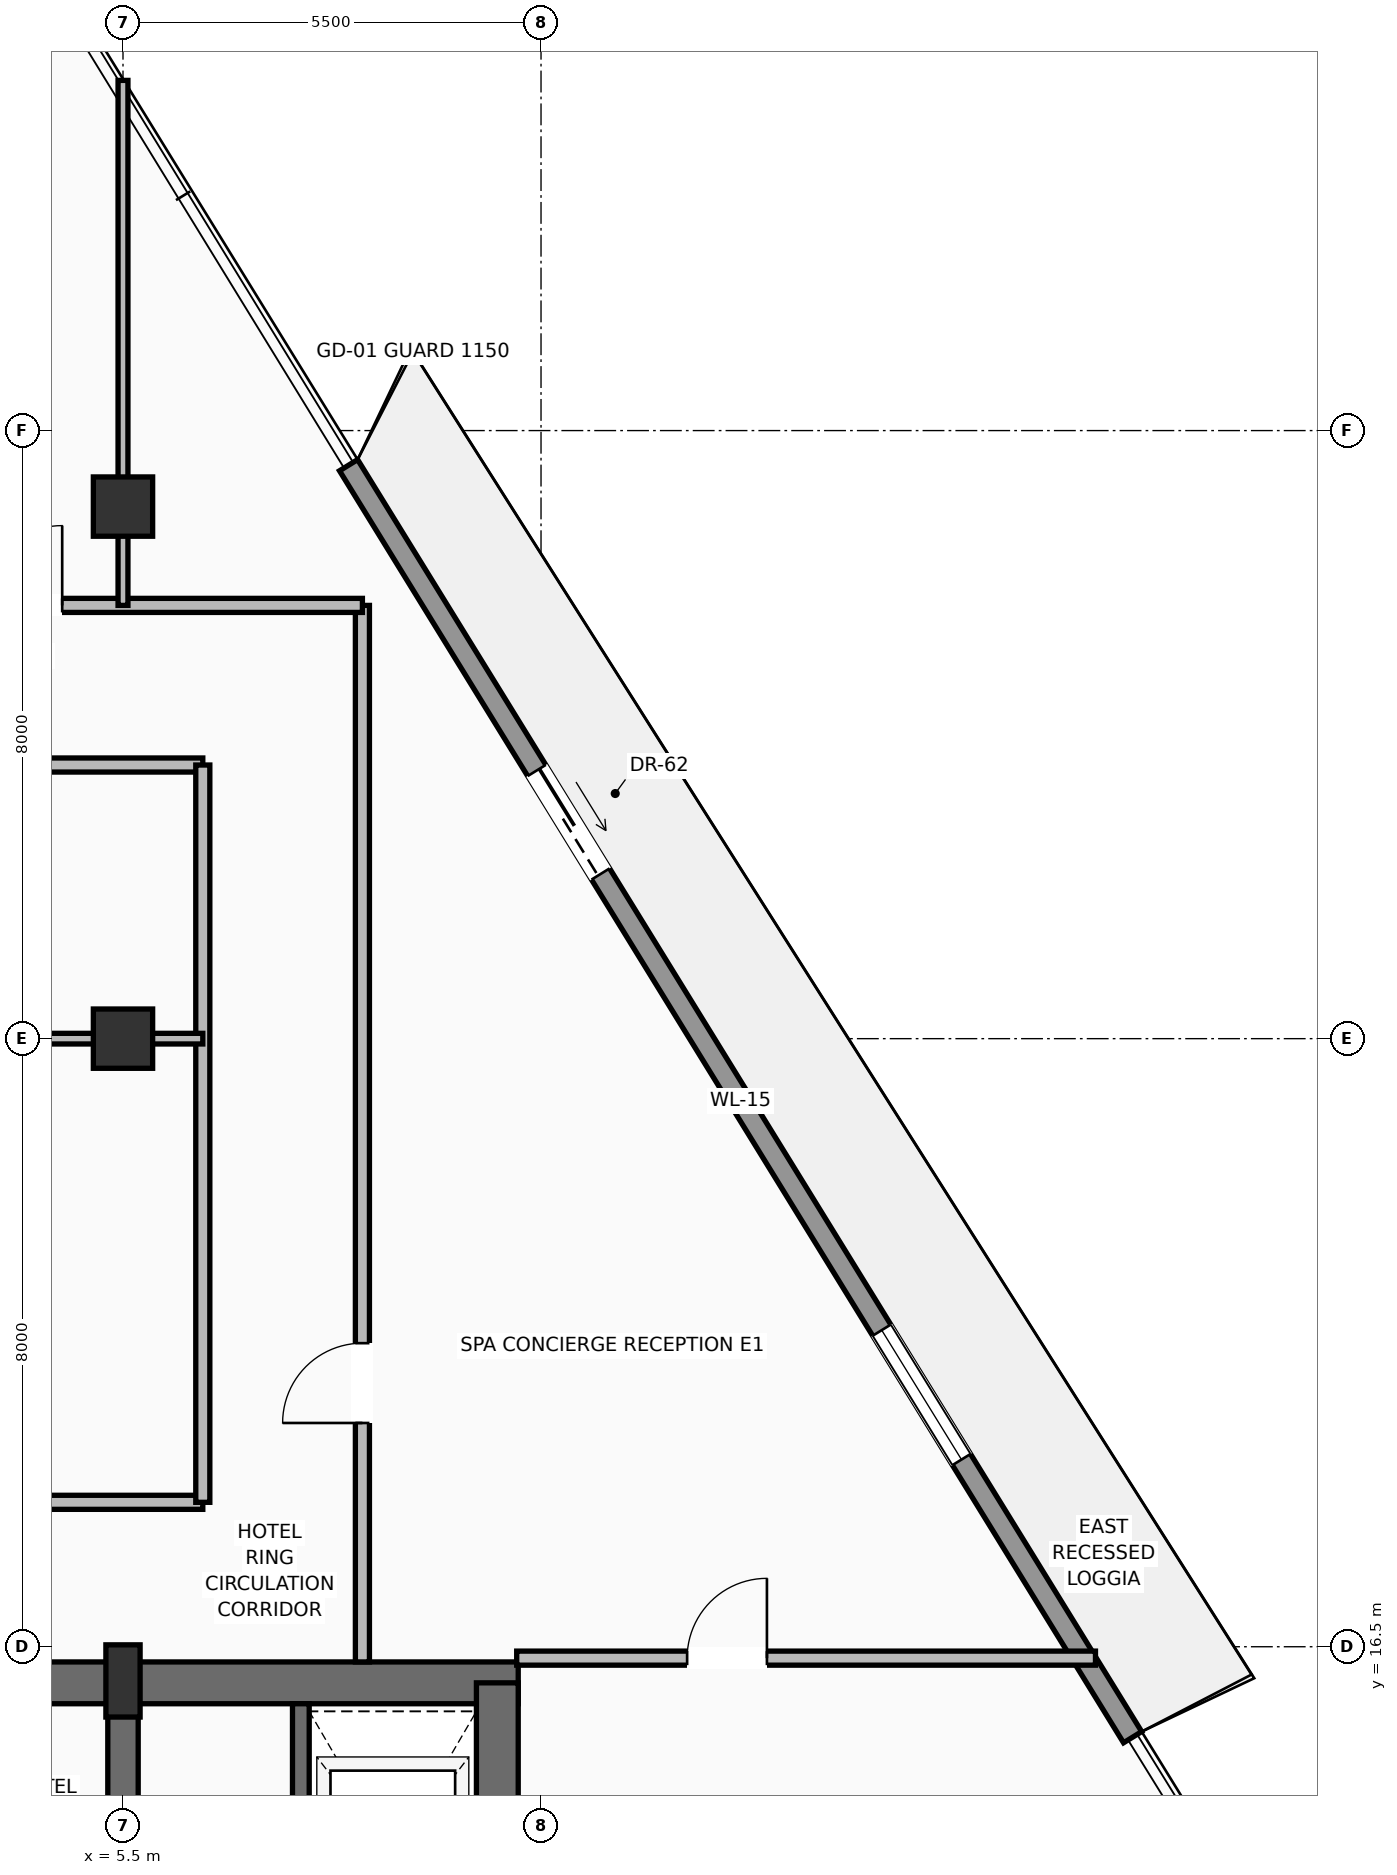
"""IFC4 building model, lengths in metres.
Left out: names, types, materials, properties, quantities, classifications, styles, units other than length and angle.
Written with IfcOpenShell. Run it as: python <this file> out.ifc"""

import sys

from ifc_helpers import new_model, si_unit, direction, frame, frame_2d, origin, origin_2d, place, context, subcontext, project, spatial, rectangle, extrude, source, transform, mapped, element, fill, save


model = new_model("IFC4")
c1 = context("Model", 3, precision=1e-05, world=origin(), true_north=direction((0.0, 1.0)))
c2 = subcontext(c1, "Body", "Model", "MODEL_VIEW")
j1 = project(units=[si_unit("LENGTHUNIT", "METRE"), si_unit("PLANEANGLEUNIT", "RADIAN")], contexts=[c1])
p1 = place(None, origin())
s1 = spatial("IfcSite", under=j1, at=p1, CompositionType="ELEMENT")
p2 = place(p1, origin())
s2 = spatial("IfcBuilding", under=s1, at=p2, CompositionType="ELEMENT")
p3 = place(p2, frame((0.0, 0.0, 240.7)))
s3 = spatial("IfcBuildingStorey", under=s2, at=p3, CompositionType="ELEMENT", Elevation=240.7)
p4 = place(p3, frame((-10.7, 16.025, 0.0), z_axis=(0.0, 0.0, 1.0), x_axis=(1.0, 0.0, 0.0)))
e1 = element("IfcWall", 1, at=p4, inside=s3, PredefinedType="SHEAR", context=c2, shape_type="SweptSolid", body=[
    extrude(rectangle(XDim=21.4, YDim=0.55, at=frame_2d((10.7, 0.0))), origin(), (0.0, 0.0, 1.0), 3.24),
])
p5 = place(p4, frame((3.27, 0.0, 0.0)))
e2 = element("IfcOpeningElement", 2, at=p5, cuts=e1, PredefinedType="OPENING", context=c2, shape_type="SweptSolid", body=[
    extrude(rectangle(XDim=1.3, YDim=2.3, at=frame_2d((0.65, 1.15))), frame((0.0, 0.285, 0.0), z_axis=(0.0, -1.0, 0.0), x_axis=(1.0, 0.0, 0.0)), (0.0, 0.0, 1.0), 0.57),
])
p6 = place(p4, frame((9.7, 0.0, 0.0)))
e3 = element("IfcOpeningElement", 3, at=p6, cuts=e1, PredefinedType="OPENING", context=c2, shape_type="SweptSolid", body=[
    extrude(rectangle(XDim=2.0, YDim=2.4, at=frame_2d((1.0, 1.2))), frame((0.0, 0.285, 0.0), z_axis=(0.0, -1.0, 0.0), x_axis=(1.0, 0.0, 0.0)), (0.0, 0.0, 1.0), 0.57),
])
p7 = place(p3, frame((10.425, 0.575, 0.0), z_axis=(0.0, 0.0, 1.0), x_axis=(0.0, 1.0, 0.0)))
e4 = element("IfcWall", 4, at=p7, inside=s3, PredefinedType="SHEAR", context=c2, shape_type="SweptSolid", body=[
    extrude(rectangle(XDim=15.45, YDim=0.55, at=frame_2d((7.725, 0.0))), origin(), (0.0, 0.0, 1.0), 3.24),
])
p8 = place(p3, frame((5.5, 0.575, 0.0), z_axis=(0.0, 0.0, 1.0), x_axis=(0.0, 1.0, 0.0)))
e5 = element("IfcWall", 5, at=p8, inside=s3, PredefinedType="SHEAR", context=c2, shape_type="SweptSolid", body=[
    extrude(rectangle(XDim=15.45, YDim=0.4, at=frame_2d((7.725, 0.0))), origin(), (0.0, 0.0, 1.0), 3.24),
])
p9 = place(p8, frame((8.925, 0.0, 0.0)))
e6 = element("IfcOpeningElement", 6, at=p9, cuts=e5, PredefinedType="OPENING", context=c2, shape_type="SweptSolid", body=[
    extrude(rectangle(XDim=1.1, YDim=2.2, at=frame_2d((0.55, 1.1))), frame((0.0, 0.21, 0.0), z_axis=(0.0, -1.0, 0.0), x_axis=(1.0, 0.0, 0.0)), (0.0, 0.0, 1.0), 0.42),
])
m1 = source(origin(), c2, "Body", "SweptSolid", [
    extrude(rectangle(XDim=0.45, YDim=0.95, at=origin_2d()), origin(), (0.0, 0.0, 1.0), 3.45),
])
p10 = place(p3, frame((5.5, 16.05, 0.0), z_axis=(0.0, 0.0, 1.0), x_axis=(1.0, 0.0, 0.0)))
e7 = element("IfcColumn", 7, at=p10, inside=s3, PredefinedType="PILASTER", context=c2, shape_type="MappedRepresentation", body=[
    mapped(m1, transform((0.0, 0.0, 0.0), scale=1.0)),
])
m2 = source(origin(), c2, "Body", "SweptSolid", [
    extrude(rectangle(XDim=0.78, YDim=0.78, at=origin_2d()), origin(), (0.0, 0.0, 1.0), 3.45),
])
for number, where, z_axis, x_axis in (
    (8, (5.5, 24.5, 0.0), (0.0, 0.0, 1.0), (1.0, 0.0, 0.0)),
    (9, (5.5, 31.5, 0.0), (0.0, 0.0, 1.0), (1.0, 0.0, 0.0)),
):
    element("IfcColumn", number, at=place(p3, frame(where, z_axis=z_axis, x_axis=x_axis)), inside=s3, PredefinedType="COLUMN", context=c2, shape_type="MappedRepresentation", body=[
        mapped(m2, transform((0.0, 0.0, 0.0), scale=1.0)),
    ])
p11 = place(p3, frame((8.468, 32.044, 0.0), z_axis=(0.0, 0.0, 1.0), x_axis=(0.524731986951, -0.851267491374, 0.0)))
e10 = element("IfcWall", 10, at=p11, inside=s3, PredefinedType="SOLIDWALL", context=c2, shape_type="SweptSolid", body=[
    extrude(rectangle(XDim=19.658, YDim=0.28, at=frame_2d((9.829, 0.0))), origin(), (0.0, 0.0, 1.0), 2.82),
])
p12 = place(p11, frame((4.718, 0.0, 0.0)))
e11 = element("IfcOpeningElement", 11, at=p12, cuts=e10, PredefinedType="OPENING", context=c2, shape_type="SweptSolid", body=[
    extrude(rectangle(XDim=1.6, YDim=2.35, at=frame_2d((0.8, 1.175))), frame((0.0, 0.15, 0.0), z_axis=(0.0, -1.0, 0.0), x_axis=(1.0, 0.0, 0.0)), (0.0, 0.0, 1.0), 0.3),
])
p13 = place(p11, frame((13.368, 0.0, 0.9)))
e12 = element("IfcOpeningElement", 12, at=p13, cuts=e10, PredefinedType="OPENING", context=c2, shape_type="SweptSolid", body=[
    extrude(rectangle(XDim=2.0, YDim=1.75, at=frame_2d((1.0, 0.875))), frame((0.0, 0.15, 0.0), z_axis=(0.0, -1.0, 0.0), x_axis=(1.0, 0.0, 0.0)), (0.0, 0.0, 1.0), 0.3),
])
p14 = place(p3, frame((7.84, 11.87, 0.0), z_axis=(0.0, 0.0, 1.0), x_axis=(0.0, 1.0, 0.0)))
e13 = element("IfcWall", 13, at=p14, inside=s3, PredefinedType="SOLIDWALL", context=c2, shape_type="SweptSolid", body=[
    extrude(rectangle(XDim=3.88, YDim=0.22, at=frame_2d((1.94, 0.0))), origin(), (0.0, 0.0, 1.0), 3.24),
])
p15 = place(p3, frame((-5.85, 18.4, 0.0), z_axis=(0.0, 0.0, 1.0), x_axis=(1.0, 0.0, 0.0)))
e14 = element("IfcWall", 14, at=p15, inside=s3, PredefinedType="PARTITIONING", context=c2, shape_type="SweptSolid", body=[
    extrude(rectangle(XDim=12.4, YDim=0.185, at=frame_2d((6.2, 0.0))), origin(), (0.0, 0.0, 1.0), 3.232),
])
p16 = place(p15, frame((5.725, 0.0, 0.0)))
e15 = element("IfcOpeningElement", 15, at=p16, cuts=e14, PredefinedType="OPENING", context=c2, shape_type="SweptSolid", body=[
    extrude(rectangle(XDim=0.95, YDim=2.2, at=frame_2d((0.475, 1.1))), frame((0.0, 0.103, 0.0), z_axis=(0.0, -1.0, 0.0), x_axis=(1.0, 0.0, 0.0)), (0.0, 0.0, 1.0), 0.205),
])
p17 = place(p3, frame((-5.85, 28.1, 0.0), z_axis=(0.0, 0.0, 1.0), x_axis=(1.0, 0.0, 0.0)))
e16 = element("IfcWall", 16, at=p17, inside=s3, PredefinedType="PARTITIONING", context=c2, shape_type="SweptSolid", body=[
    extrude(rectangle(XDim=12.4, YDim=0.185, at=frame_2d((6.2, 0.0))), origin(), (0.0, 0.0, 1.0), 2.885),
])
p18 = place(p17, frame((5.725, 0.0, 0.0)))
e17 = element("IfcOpeningElement", 17, at=p18, cuts=e16, PredefinedType="OPENING", context=c2, shape_type="SweptSolid", body=[
    extrude(rectangle(XDim=0.95, YDim=2.2, at=frame_2d((0.475, 1.1))), frame((0.0, 0.103, 0.0), z_axis=(0.0, -1.0, 0.0), x_axis=(1.0, 0.0, 0.0)), (0.0, 0.0, 1.0), 0.205),
])
p19 = place(p3, frame((6.55, 18.4, 0.0), z_axis=(0.0, 0.0, 1.0), x_axis=(0.0, 1.0, 0.0)))
e18 = element("IfcWall", 18, at=p19, inside=s3, PredefinedType="PARTITIONING", context=c2, shape_type="SweptSolid", body=[
    extrude(rectangle(XDim=9.7, YDim=0.185, at=frame_2d((4.85, 0.0))), origin(), (0.0, 0.0, 1.0), 3.232),
])
p20 = place(p3, frame((8.65, 16.3, 0.0), z_axis=(0.0, 0.0, 1.0), x_axis=(0.0, 1.0, 0.0)))
e19 = element("IfcWall", 19, at=p20, inside=s3, PredefinedType="PARTITIONING", context=c2, shape_type="SweptSolid", body=[
    extrude(rectangle(XDim=13.9, YDim=0.185, at=frame_2d((6.95, 0.0))), origin(), (0.0, 0.0, 1.0), 3.232),
])
p21 = place(p20, frame((3.144, 0.0, 0.0)))
e20 = element("IfcOpeningElement", 20, at=p21, cuts=e19, PredefinedType="OPENING", context=c2, shape_type="SweptSolid", body=[
    extrude(rectangle(XDim=1.05, YDim=2.25, at=frame_2d((0.525, 1.125))), frame((0.0, 0.103, 0.0), z_axis=(0.0, -1.0, 0.0), x_axis=(1.0, 0.0, 0.0)), (0.0, 0.0, 1.0), 0.205),
])
p22 = place(p3, frame((-7.95, 30.2, 0.0), z_axis=(0.0, 0.0, 1.0), x_axis=(1.0, 0.0, 0.0)))
e21 = element("IfcWall", 21, at=p22, inside=s3, PredefinedType="PARTITIONING", context=c2, shape_type="SweptSolid", body=[
    extrude(rectangle(XDim=16.6, YDim=0.185, at=frame_2d((8.3, 0.0))), origin(), (0.0, 0.0, 1.0), 3.232),
])
p23 = place(p22, frame((3.25, 0.0, 0.0)))
e22 = element("IfcOpeningElement", 22, at=p23, cuts=e21, PredefinedType="OPENING", context=c2, shape_type="SweptSolid", body=[
    extrude(rectangle(XDim=1.05, YDim=2.25, at=frame_2d((0.525, 1.125))), frame((0.0, 0.103, 0.0), z_axis=(0.0, -1.0, 0.0), x_axis=(1.0, 0.0, 0.0)), (0.0, 0.0, 1.0), 0.205),
])
p24 = place(p22, frame((7.775, 0.0, 0.0)))
e23 = element("IfcOpeningElement", 23, at=p24, cuts=e21, PredefinedType="OPENING", context=c2, shape_type="SweptSolid", body=[
    extrude(rectangle(XDim=1.05, YDim=2.25, at=frame_2d((0.525, 1.125))), frame((0.0, 0.103, 0.0), z_axis=(0.0, -1.0, 0.0), x_axis=(1.0, 0.0, 0.0)), (0.0, 0.0, 1.0), 0.205),
])
p25 = place(p22, frame((11.6, 0.0, 0.0)))
e24 = element("IfcOpeningElement", 24, at=p25, cuts=e21, PredefinedType="OPENING", context=c2, shape_type="SweptSolid", body=[
    extrude(rectangle(XDim=1.05, YDim=2.25, at=frame_2d((0.525, 1.125))), frame((0.0, 0.103, 0.0), z_axis=(0.0, -1.0, 0.0), x_axis=(1.0, 0.0, 0.0)), (0.0, 0.0, 1.0), 0.205),
])
p26 = place(p3, frame((-5.85, 24.5, 0.0), z_axis=(0.0, 0.0, 1.0), x_axis=(1.0, 0.0, 0.0)))
e25 = element("IfcWall", 25, at=p26, inside=s3, PredefinedType="PARTITIONING", context=c2, shape_type="SweptSolid", body=[
    extrude(rectangle(XDim=12.4, YDim=0.14, at=frame_2d((6.2, 0.0))), origin(), (0.0, 0.0, 1.0), 2.683),
])
p27 = place(p3, frame((10.68, 16.35, 0.0), z_axis=(0.0, 0.0, 1.0), x_axis=(1.0, 0.0, 0.0)))
e26 = element("IfcWall", 26, at=p27, inside=s3, PredefinedType="PARTITIONING", context=c2, shape_type="SweptSolid", body=[
    extrude(rectangle(XDim=7.615, YDim=0.185, at=frame_2d((3.808, 0.0))), origin(), (0.0, 0.0, 1.0), 3.232),
])
p28 = place(p27, frame((2.242, 0.0, 0.0)))
e27 = element("IfcOpeningElement", 27, at=p28, cuts=e26, PredefinedType="OPENING", context=c2, shape_type="SweptSolid", body=[
    extrude(rectangle(XDim=1.05, YDim=2.25, at=frame_2d((0.525, 1.125))), frame((0.0, 0.103, 0.0), z_axis=(0.0, -1.0, 0.0), x_axis=(1.0, 0.0, 0.0)), (0.0, 0.0, 1.0), 0.205),
])
p29 = place(p3, frame((5.5, 30.2, 0.0), z_axis=(0.0, 0.0, 1.0), x_axis=(0.0, 1.0, 0.0)))
e28 = element("IfcWall", 28, at=p29, inside=s3, PredefinedType="PARTITIONING", context=c2, shape_type="SweptSolid", body=[
    extrude(rectangle(XDim=6.907, YDim=0.13, at=frame_2d((3.454, 0.0))), origin(), (0.0, 0.0, 1.0), 2.683),
])
m3 = source(origin(), c2, "Body", "SweptSolid", [
    extrude(rectangle(XDim=1.6, YDim=2.35, at=frame_2d((0.8, 1.175))), frame((0.0, 0.025, 0.0), z_axis=(0.0, -1.0, 0.0), x_axis=(1.0, 0.0, 0.0)), (0.0, 0.0, 1.0), 0.05),
])
p30 = place(p12, origin())
e29 = element("IfcDoor", 29, at=p30, inside=s3, OperationType="SLIDING_TO_RIGHT", PredefinedType="DOOR", context=c2, shape_type="MappedRepresentation", body=[
    mapped(m3, transform((0.0, 0.0, 0.0), scale=1.0)),
])
fill(e11, e29)
m4 = source(origin(), c2, "Body", "SweptSolid", [
    extrude(rectangle(XDim=2.0, YDim=1.75, at=frame_2d((1.0, 0.875))), frame((0.0, 0.03, 0.0), z_axis=(0.0, -1.0, 0.0), x_axis=(1.0, 0.0, 0.0)), (0.0, 0.0, 1.0), 0.06),
])
p31 = place(p13, origin())
e30 = element("IfcWindow", 30, at=p31, inside=s3, PartitioningType="SINGLE_PANEL", PredefinedType="WINDOW", context=c2, shape_type="MappedRepresentation", body=[
    mapped(m4, transform((0.0, 0.0, 0.0), scale=1.0)),
])
fill(e12, e30)
m5 = source(origin(), c2, "Body", "SweptSolid", [
    extrude(rectangle(XDim=1.05, YDim=2.25, at=frame_2d((0.525, 1.125))), frame((0.0, 0.025, 0.0), z_axis=(0.0, -1.0, 0.0), x_axis=(1.0, 0.0, 0.0)), (0.0, 0.0, 1.0), 0.05),
])
p32 = place(p28, origin())
e31 = element("IfcDoor", 31, at=p32, inside=s3, OperationType="SINGLE_SWING_RIGHT", PredefinedType="DOOR", context=c2, shape_type="MappedRepresentation", body=[
    mapped(m5, transform((0.0, 0.0, 0.0), scale=1.0)),
])
fill(e27, e31)
p33 = place(p21, origin())
e32 = element("IfcDoor", 32, at=p33, inside=s3, OperationType="SINGLE_SWING_LEFT", PredefinedType="DOOR", context=c2, shape_type="MappedRepresentation", body=[
    mapped(m5, transform((0.0, 0.0, 0.0), scale=1.0)),
])
fill(e20, e32)
p34 = place(p25, origin())
e33 = element("IfcDoor", 33, at=p34, inside=s3, OperationType="SINGLE_SWING_RIGHT", PredefinedType="DOOR", context=c2, shape_type="MappedRepresentation", body=[
    mapped(m5, transform((0.0, 0.0, 0.0), scale=1.0)),
])
fill(e24, e33)
save(model, sys.argv[1])
